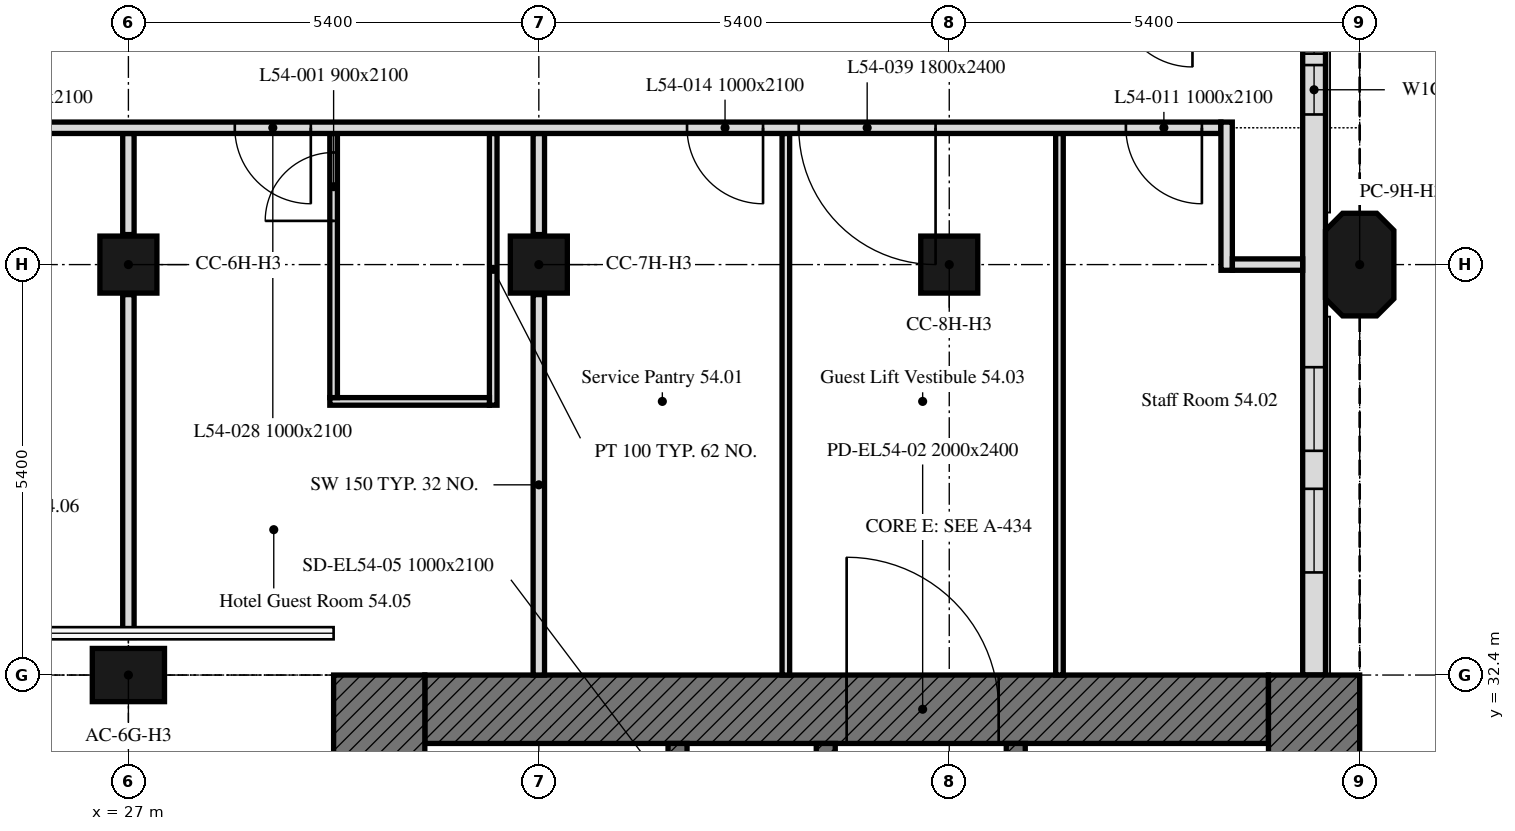
"""IFC4 building model, lengths in metres.
Left out: names, types, materials, properties, quantities, classifications, styles, units other than length and angle.
Written with IfcOpenShell. Run it as: python <this file> out.ifc"""

import sys

from ifc_helpers import new_model, si_unit, direction, frame, frame_2d, origin, origin_2d, place, context, subcontext, project, spatial, polyline, rectangle, outline, extrude, element, fill, save


model = new_model("IFC4")
c1 = context("Model", 3, precision=1e-05, world=origin(), true_north=direction((0.0, 1.0)))
c2 = subcontext(c1, "Body", "Model", "MODEL_VIEW")
j1 = project(units=[si_unit("LENGTHUNIT", "METRE"), si_unit("PLANEANGLEUNIT", "RADIAN")], contexts=[c1])
p1 = place(None, origin())
s1 = spatial("IfcSite", under=j1, at=p1, CompositionType="ELEMENT")
p2 = place(p1, origin())
s2 = spatial("IfcBuilding", under=s1, at=p2, CompositionType="ELEMENT")
p3 = place(p2, frame((0.0, 0.0, 217.0)))
s3 = spatial("IfcBuildingStorey", under=s2, at=p3, CompositionType="ELEMENT", Elevation=217.0)
p4 = place(p3, frame((27.0, 32.4, 0.0), z_axis=(0.0, 0.0, 1.0), x_axis=(1.0, 0.0, 0.0)))
e1 = element("IfcColumn", 1, at=p4, inside=s3, PredefinedType="COLUMN", context=c2, shape_type="SweptSolid", body=[
    extrude(rectangle(XDim=0.95, YDim=0.7, at=origin_2d()), origin(), (0.0, 0.0, 1.0), 3.0),
])
for number, where, z_axis, x_axis in (
    (2, (27.0, 37.8, 0.0), (0.0, 0.0, 1.0), (1.0, 0.0, 0.0)),
    (3, (32.4, 37.8, 0.0), (0.0, 0.0, 1.0), (1.0, 0.0, 0.0)),
    (4, (37.8, 37.8, 0.0), (0.0, 0.0, 1.0), (1.0, 0.0, 0.0)),
):
    element("IfcColumn", number, at=place(p3, frame(where, z_axis=z_axis, x_axis=x_axis)), inside=s3, PredefinedType="COLUMN", context=c2, shape_type="SweptSolid", body=[
        extrude(rectangle(XDim=0.75, YDim=0.75, at=origin_2d()), origin(), (0.0, 0.0, 1.0), 3.0),
    ])
p5 = place(p3, frame((43.2, 37.8, 0.0), z_axis=(0.0, 0.0, 1.0), x_axis=(0.0, 1.0, 0.0)))
e5 = element("IfcColumn", 5, at=p5, inside=s3, PredefinedType="COLUMN", context=c2, shape_type="SweptSolid", body=[
    extrude(outline(polyline([(-0.45, -0.45), (0.45, -0.45), (0.675, -0.225), (0.675, 0.225), (0.45, 0.45), (-0.45, 0.45), (-0.675, 0.225), (-0.675, -0.225), (-0.45, -0.45)])), origin(), (0.0, 0.0, 1.0), 3.0),
])
p6 = place(p3, frame((42.6, 32.4, 0.0), z_axis=(0.0, 0.0, 1.0), x_axis=(0.0, 1.0, 0.0)))
e6 = element("IfcWall", 6, at=p6, inside=s3, PredefinedType="SOLIDWALL", context=c2, shape_type="SweptSolid", body=[
    extrude(rectangle(XDim=10.614, YDim=0.3, at=frame_2d((5.307, 0.0))), origin(), (0.0, 0.0, 1.0), 3.0),
])
p7 = place(p6, frame((1.35, 0.0, 0.9)))
e7 = element("IfcOpeningElement", 7, at=p7, cuts=e6, PredefinedType="OPENING", context=c2, shape_type="SweptSolid", body=[
    extrude(rectangle(XDim=1.1, YDim=1.7, at=frame_2d((0.55, 0.85))), frame((0.0, 0.16, 0.0), z_axis=(0.0, -1.0, 0.0), x_axis=(1.0, 0.0, 0.0)), (0.0, 0.0, 1.0), 0.32),
])
p8 = place(p6, frame((2.95, 0.0, 0.9)))
e8 = element("IfcOpeningElement", 8, at=p8, cuts=e6, PredefinedType="OPENING", context=c2, shape_type="SweptSolid", body=[
    extrude(rectangle(XDim=1.1, YDim=1.7, at=frame_2d((0.55, 0.85))), frame((0.0, 0.16, 0.0), z_axis=(0.0, -1.0, 0.0), x_axis=(1.0, 0.0, 0.0)), (0.0, 0.0, 1.0), 0.32),
])
p9 = place(p6, frame((7.375, 0.0, 0.9)))
e9 = element("IfcOpeningElement", 9, at=p9, cuts=e6, PredefinedType="OPENING", context=c2, shape_type="SweptSolid", body=[
    extrude(rectangle(XDim=0.65, YDim=1.7, at=frame_2d((0.325, 0.85))), frame((0.0, 0.16, 0.0), z_axis=(0.0, -1.0, 0.0), x_axis=(1.0, 0.0, 0.0)), (0.0, 0.0, 1.0), 0.32),
])
p10 = place(p6, frame((8.175, 0.0, 0.9)))
e10 = element("IfcOpeningElement", 10, at=p10, cuts=e6, PredefinedType="OPENING", context=c2, shape_type="SweptSolid", body=[
    extrude(rectangle(XDim=0.65, YDim=1.7, at=frame_2d((0.325, 0.85))), frame((0.0, 0.16, 0.0), z_axis=(0.0, -1.0, 0.0), x_axis=(1.0, 0.0, 0.0)), (0.0, 0.0, 1.0), 0.32),
])
p11 = place(p3, frame((30.9, 31.95, 0.0), z_axis=(0.0, 0.0, 1.0), x_axis=(1.0, 0.0, 0.0)))
e11 = element("IfcWall", 11, at=p11, inside=s3, PredefinedType="SOLIDWALL", context=c2, shape_type="SweptSolid", body=[
    extrude(rectangle(XDim=11.1, YDim=0.9, at=frame_2d((5.55, 0.0))), origin(), (0.0, 0.0, 1.0), 3.0),
])
p12 = place(p11, frame((5.55, 0.0, 0.0)))
e12 = element("IfcOpeningElement", 12, at=p12, cuts=e11, PredefinedType="OPENING", context=c2, shape_type="SweptSolid", body=[
    extrude(rectangle(XDim=2.0, YDim=2.4, at=frame_2d((1.0, 1.2))), frame((0.0, 0.45, 0.0), z_axis=(0.0, -1.0, 0.0), x_axis=(1.0, 0.0, 0.0)), (0.0, 0.0, 1.0), 0.9),
])
for number, where, z_axis, x_axis in (
    (13, (42.6, 32.4, 0.0), (0.0, 0.0, 1.0), (0.0, -1.0, 0.0)),
    (14, (30.3, 16.2, 0.0), (0.0, 0.0, 1.0), (0.0, 1.0, 0.0)),
):
    element("IfcWall", number, at=place(p3, frame(where, z_axis=z_axis, x_axis=x_axis)), inside=s3, PredefinedType="SOLIDWALL", context=c2, shape_type="SweptSolid", body=[
        extrude(rectangle(XDim=16.2, YDim=1.2, at=frame_2d((8.1, 0.0))), origin(), (0.0, 0.0, 1.0), 3.0),
    ])
p13 = place(p3, frame((38.675, 17.1, 0.0), z_axis=(0.0, 0.0, 1.0), x_axis=(0.0, 1.0, 0.0)))
e15 = element("IfcWall", 15, at=p13, inside=s3, PredefinedType="SOLIDWALL", context=c2, shape_type="SweptSolid", body=[
    extrude(rectangle(XDim=14.4, YDim=0.25, at=frame_2d((7.2, 0.0))), origin(), (0.0, 0.0, 1.0), 3.0),
])
p14 = place(p13, frame((4.6, 0.0, 0.0)))
e16 = element("IfcOpeningElement", 16, at=p14, cuts=e15, PredefinedType="OPENING", context=c2, shape_type="SweptSolid", body=[
    extrude(rectangle(XDim=1.0, YDim=2.1, at=frame_2d((0.5, 1.05))), frame((0.0, 0.125, 0.0), z_axis=(0.0, -1.0, 0.0), x_axis=(1.0, 0.0, 0.0)), (0.0, 0.0, 1.0), 0.25),
])
p15 = place(p13, frame((7.062, 0.0, 0.0)))
e17 = element("IfcOpeningElement", 17, at=p15, cuts=e15, PredefinedType="OPENING", context=c2, shape_type="SweptSolid", body=[
    extrude(rectangle(XDim=1.2, YDim=2.1, at=frame_2d((0.6, 1.05))), frame((0.0, 0.125, 0.0), z_axis=(0.0, -1.0, 0.0), x_axis=(1.0, 0.0, 0.0)), (0.0, 0.0, 1.0), 0.25),
])
p16 = place(p13, frame((9.599, 0.0, 0.0)))
e18 = element("IfcOpeningElement", 18, at=p16, cuts=e15, PredefinedType="OPENING", context=c2, shape_type="SweptSolid", body=[
    extrude(rectangle(XDim=0.9, YDim=2.1, at=frame_2d((0.45, 1.05))), frame((0.0, 0.125, 0.0), z_axis=(0.0, -1.0, 0.0), x_axis=(1.0, 0.0, 0.0)), (0.0, 0.0, 1.0), 0.25),
])
p17 = place(p13, frame((11.032, 0.0, 0.0)))
e19 = element("IfcOpeningElement", 19, at=p17, cuts=e15, PredefinedType="OPENING", context=c2, shape_type="SweptSolid", body=[
    extrude(rectangle(XDim=0.9, YDim=2.1, at=frame_2d((0.45, 1.05))), frame((0.0, 0.125, 0.0), z_axis=(0.0, -1.0, 0.0), x_axis=(1.0, 0.0, 0.0)), (0.0, 0.0, 1.0), 0.25),
])
p18 = place(p13, frame((12.846, 0.0, 0.0)))
e20 = element("IfcOpeningElement", 20, at=p18, cuts=e15, PredefinedType="OPENING", context=c2, shape_type="SweptSolid", body=[
    extrude(rectangle(XDim=0.9, YDim=2.1, at=frame_2d((0.45, 1.05))), frame((0.0, 0.125, 0.0), z_axis=(0.0, -1.0, 0.0), x_axis=(1.0, 0.0, 0.0)), (0.0, 0.0, 1.0), 0.25),
])
p19 = place(p3, frame((34.225, 17.1, 0.0), z_axis=(0.0, 0.0, 1.0), x_axis=(0.0, 1.0, 0.0)))
e21 = element("IfcWall", 21, at=p19, inside=s3, PredefinedType="SOLIDWALL", context=c2, shape_type="SweptSolid", body=[
    extrude(rectangle(XDim=14.4, YDim=0.25, at=frame_2d((7.2, 0.0))), origin(), (0.0, 0.0, 1.0), 3.0),
])
p20 = place(p19, frame((13.15, 0.0, 0.0)))
e22 = element("IfcOpeningElement", 22, at=p20, cuts=e21, PredefinedType="OPENING", context=c2, shape_type="SweptSolid", body=[
    extrude(rectangle(XDim=1.0, YDim=2.1, at=frame_2d((0.5, 1.05))), frame((0.0, 0.125, 0.0), z_axis=(0.0, -1.0, 0.0), x_axis=(1.0, 0.0, 0.0)), (0.0, 0.0, 1.0), 0.25),
])
p21 = place(p19, frame((0.6, 0.0, 0.0)))
e23 = element("IfcOpeningElement", 23, at=p21, cuts=e21, PredefinedType="OPENING", context=c2, shape_type="SweptSolid", body=[
    extrude(rectangle(XDim=1.1, YDim=2.1, at=frame_2d((0.55, 1.05))), frame((0.0, 0.125, 0.0), z_axis=(0.0, -1.0, 0.0), x_axis=(1.0, 0.0, 0.0)), (0.0, 0.0, 1.0), 0.25),
])
p22 = place(p19, frame((3.25, 0.0, 0.0)))
e24 = element("IfcOpeningElement", 24, at=p22, cuts=e21, PredefinedType="OPENING", context=c2, shape_type="SweptSolid", body=[
    extrude(rectangle(XDim=0.9, YDim=2.1, at=frame_2d((0.45, 1.05))), frame((0.0, 0.125, 0.0), z_axis=(0.0, -1.0, 0.0), x_axis=(1.0, 0.0, 0.0)), (0.0, 0.0, 1.0), 0.25),
])
p23 = place(p3, frame((36.175, 29.4, 0.0), z_axis=(0.0, 0.0, 1.0), x_axis=(0.0, 1.0, 0.0)))
e25 = element("IfcWall", 25, at=p23, inside=s3, PredefinedType="SOLIDWALL", context=c2, shape_type="SweptSolid", body=[
    extrude(rectangle(XDim=2.1, YDim=0.25, at=frame_2d((1.05, 0.0))), origin(), (0.0, 0.0, 1.0), 3.0),
])
p24 = place(p23, frame((0.5, 0.0, 0.0)))
e26 = element("IfcOpeningElement", 26, at=p24, cuts=e25, PredefinedType="OPENING", context=c2, shape_type="SweptSolid", body=[
    extrude(rectangle(XDim=1.0, YDim=2.1, at=frame_2d((0.5, 1.05))), frame((0.0, 0.125, 0.0), z_axis=(0.0, -1.0, 0.0), x_axis=(1.0, 0.0, 0.0)), (0.0, 0.0, 1.0), 0.25),
])
p25 = place(p3, frame((32.4, 32.4, 0.0), z_axis=(0.0, 0.0, 1.0), x_axis=(0.0, 1.0, 0.0)))
e27 = element("IfcWall", 27, at=p25, inside=s3, PredefinedType="PARTITIONING", context=c2, shape_type="SweptSolid", body=[
    extrude(rectangle(XDim=5.005, YDim=0.15, at=frame_2d((2.502, 0.0))), origin(), (0.0, 0.0, 1.0), 2.4),
])
p26 = place(p3, frame((32.4, 38.195, 0.0), z_axis=(0.0, 0.0, 1.0), x_axis=(0.0, 1.0, 0.0)))
e28 = element("IfcWall", 28, at=p26, inside=s3, PredefinedType="PARTITIONING", context=c2, shape_type="SweptSolid", body=[
    extrude(rectangle(XDim=1.33, YDim=0.15, at=frame_2d((0.665, 0.0))), origin(), (0.0, 0.0, 1.0), 2.4),
])
p27 = place(p3, frame((31.8, 39.525, 0.0), z_axis=(0.0, 0.0, 1.0), x_axis=(0.0, -1.0, 0.0)))
e29 = element("IfcWall", 29, at=p27, inside=s3, PredefinedType="PARTITIONING", context=c2, shape_type="SweptSolid", body=[
    extrude(rectangle(XDim=3.575, YDim=0.1, at=frame_2d((1.788, 0.0))), origin(), (0.0, 0.0, 1.0), 3.0),
])
p28 = place(p3, frame((31.75, 36.0, 0.0), z_axis=(0.0, 0.0, 1.0), x_axis=(-1.0, 0.0, 0.0)))
e30 = element("IfcWall", 30, at=p28, inside=s3, PredefinedType="PARTITIONING", context=c2, shape_type="SweptSolid", body=[
    extrude(rectangle(XDim=2.1, YDim=0.1, at=frame_2d((1.05, 0.0))), origin(), (0.0, 0.0, 1.0), 3.0),
])
p29 = place(p3, frame((29.7, 36.05, 0.0), z_axis=(0.0, 0.0, 1.0), x_axis=(0.0, 1.0, 0.0)))
e31 = element("IfcWall", 31, at=p29, inside=s3, PredefinedType="PARTITIONING", context=c2, shape_type="SweptSolid", body=[
    extrude(rectangle(XDim=3.475, YDim=0.1, at=frame_2d((1.737, 0.0))), origin(), (0.0, 0.0, 1.0), 3.0),
])
p30 = place(p29, frame((2.325, 0.0, 0.0)))
e32 = element("IfcOpeningElement", 32, at=p30, cuts=e31, PredefinedType="OPENING", context=c2, shape_type="SweptSolid", body=[
    extrude(rectangle(XDim=0.9, YDim=2.1, at=frame_2d((0.45, 1.05))), frame((0.0, 0.05, 0.0), z_axis=(0.0, -1.0, 0.0), x_axis=(1.0, 0.0, 0.0)), (0.0, 0.0, 1.0), 0.1),
])
p31 = place(p3, frame((27.0, 39.525, 0.0), z_axis=(0.0, 0.0, 1.0), x_axis=(0.0, -1.0, 0.0)))
e33 = element("IfcWall", 33, at=p31, inside=s3, PredefinedType="PARTITIONING", context=c2, shape_type="SweptSolid", body=[
    extrude(rectangle(XDim=1.33, YDim=0.15, at=frame_2d((0.665, 0.0))), origin(), (0.0, 0.0, 1.0), 2.4),
])
p32 = place(p3, frame((27.0, 37.405, 0.0), z_axis=(0.0, 0.0, 1.0), x_axis=(0.0, -1.0, 0.0)))
e34 = element("IfcWall", 34, at=p32, inside=s3, PredefinedType="PARTITIONING", context=c2, shape_type="SweptSolid", body=[
    extrude(rectangle(XDim=4.51, YDim=0.15, at=frame_2d((2.255, 0.0))), origin(), (0.0, 0.0, 1.0), 2.4),
])
for number, where, z_axis, x_axis in (
    (35, (39.25, 32.4, 0.0), (0.0, 0.0, 1.0), (0.0, 1.0, 0.0)),
    (36, (35.65, 39.525, 0.0), (0.0, 0.0, 1.0), (0.0, -1.0, 0.0)),
):
    element("IfcWall", number, at=place(p3, frame(where, z_axis=z_axis, x_axis=x_axis)), inside=s3, PredefinedType="PARTITIONING", context=c2, shape_type="SweptSolid", body=[
        extrude(rectangle(XDim=7.125, YDim=0.1, at=frame_2d((3.562, 0.0))), origin(), (0.0, 0.0, 1.0), 3.0),
    ])
p33 = place(p3, frame((41.374, 39.6, 0.0), z_axis=(0.0, 0.0, 1.0), x_axis=(-1.0, 0.0, 0.0)))
e37 = element("IfcWall", 37, at=p33, inside=s3, PredefinedType="PARTITIONING", context=c2, shape_type="SweptSolid", body=[
    extrude(rectangle(XDim=35.899, YDim=0.15, at=frame_2d((17.949, 0.0))), origin(), (0.0, 0.0, 1.0), 2.4),
])
p34 = place(p33, frame((0.25, 0.0, 0.0)))
e38 = element("IfcOpeningElement", 38, at=p34, cuts=e37, PredefinedType="OPENING", context=c2, shape_type="SweptSolid", body=[
    extrude(rectangle(XDim=1.0, YDim=2.1, at=frame_2d((0.5, 1.05))), frame((0.0, 0.075, 0.0), z_axis=(0.0, -1.0, 0.0), x_axis=(1.0, 0.0, 0.0)), (0.0, 0.0, 1.0), 0.15),
])
p35 = place(p33, frame((27.124, 0.0, 0.0)))
e39 = element("IfcOpeningElement", 39, at=p35, cuts=e37, PredefinedType="OPENING", context=c2, shape_type="SweptSolid", body=[
    extrude(rectangle(XDim=1.0, YDim=2.1, at=frame_2d((0.5, 1.05))), frame((0.0, 0.075, 0.0), z_axis=(0.0, -1.0, 0.0), x_axis=(1.0, 0.0, 0.0)), (0.0, 0.0, 1.0), 0.15),
])
p36 = place(p33, frame((6.024, 0.0, 0.0)))
e40 = element("IfcOpeningElement", 40, at=p36, cuts=e37, PredefinedType="OPENING", context=c2, shape_type="SweptSolid", body=[
    extrude(rectangle(XDim=1.0, YDim=2.1, at=frame_2d((0.5, 1.05))), frame((0.0, 0.075, 0.0), z_axis=(0.0, -1.0, 0.0), x_axis=(1.0, 0.0, 0.0)), (0.0, 0.0, 1.0), 0.15),
])
p37 = place(p33, frame((11.974, 0.0, 0.0)))
e41 = element("IfcOpeningElement", 41, at=p37, cuts=e37, PredefinedType="OPENING", context=c2, shape_type="SweptSolid", body=[
    extrude(rectangle(XDim=1.0, YDim=2.1, at=frame_2d((0.5, 1.05))), frame((0.0, 0.075, 0.0), z_axis=(0.0, -1.0, 0.0), x_axis=(1.0, 0.0, 0.0)), (0.0, 0.0, 1.0), 0.15),
])
p38 = place(p33, frame((15.774, 0.0, 0.0)))
e42 = element("IfcOpeningElement", 42, at=p38, cuts=e37, PredefinedType="OPENING", context=c2, shape_type="SweptSolid", body=[
    extrude(rectangle(XDim=1.0, YDim=2.1, at=frame_2d((0.5, 1.05))), frame((0.0, 0.075, 0.0), z_axis=(0.0, -1.0, 0.0), x_axis=(1.0, 0.0, 0.0)), (0.0, 0.0, 1.0), 0.15),
])
p39 = place(p33, frame((22.774, 0.0, 0.0)))
e43 = element("IfcOpeningElement", 43, at=p39, cuts=e37, PredefinedType="OPENING", context=c2, shape_type="SweptSolid", body=[
    extrude(rectangle(XDim=1.0, YDim=2.1, at=frame_2d((0.5, 1.05))), frame((0.0, 0.075, 0.0), z_axis=(0.0, -1.0, 0.0), x_axis=(1.0, 0.0, 0.0)), (0.0, 0.0, 1.0), 0.15),
])
p40 = place(p33, frame((3.754, 0.0, 0.0)))
e44 = element("IfcOpeningElement", 44, at=p40, cuts=e37, PredefinedType="OPENING", context=c2, shape_type="SweptSolid", body=[
    extrude(rectangle(XDim=1.8, YDim=2.4, at=frame_2d((0.9, 1.2))), frame((0.0, 0.075, 0.0), z_axis=(0.0, -1.0, 0.0), x_axis=(1.0, 0.0, 0.0)), (0.0, 0.0, 1.0), 0.15),
])
p41 = place(p33, frame((29.124, 0.0, 0.0)))
e45 = element("IfcOpeningElement", 45, at=p41, cuts=e37, PredefinedType="OPENING", context=c2, shape_type="SweptSolid", body=[
    extrude(rectangle(XDim=1.0, YDim=2.1, at=frame_2d((0.5, 1.05))), frame((0.0, 0.075, 0.0), z_axis=(0.0, -1.0, 0.0), x_axis=(1.0, 0.0, 0.0)), (0.0, 0.0, 1.0), 0.15),
])
p42 = place(p3, frame((41.449, 39.675, 0.0), z_axis=(0.0, 0.0, 1.0), x_axis=(0.00050081376, -0.999999874593, 0.0)))
e46 = element("IfcWall", 46, at=p42, inside=s3, PredefinedType="PARTITIONING", context=c2, shape_type="SweptSolid", body=[
    extrude(rectangle(XDim=1.95, YDim=0.15, at=frame_2d((0.975, 0.0))), origin(), (0.0, 0.0, 1.0), 3.0),
])
p43 = place(p3, frame((41.525, 37.8, 0.0), z_axis=(0.0, 0.0, 1.0), x_axis=(1.0, 0.0, 0.0)))
e47 = element("IfcWall", 47, at=p43, inside=s3, PredefinedType="PARTITIONING", context=c2, shape_type="SweptSolid", body=[
    extrude(rectangle(XDim=0.925, YDim=0.15, at=frame_2d((0.462, 0.0))), origin(), (0.0, 0.0, 1.0), 3.0),
])
p44 = place(p7, origin())
e48 = element("IfcWindow", 48, at=p44, inside=s3, PartitioningType="SINGLE_PANEL", PredefinedType="WINDOW", context=c2, shape_type="SweptSolid", body=[
    extrude(rectangle(XDim=1.1, YDim=1.7, at=frame_2d((0.55, 0.85))), frame((0.0, 0.03, 0.0), z_axis=(0.0, -1.0, 0.0), x_axis=(1.0, 0.0, 0.0)), (0.0, 0.0, 1.0), 0.06),
])
fill(e7, e48)
p45 = place(p8, origin())
e49 = element("IfcWindow", 49, at=p45, inside=s3, PartitioningType="SINGLE_PANEL", PredefinedType="WINDOW", context=c2, shape_type="SweptSolid", body=[
    extrude(rectangle(XDim=1.1, YDim=1.7, at=frame_2d((0.55, 0.85))), frame((0.0, 0.03, 0.0), z_axis=(0.0, -1.0, 0.0), x_axis=(1.0, 0.0, 0.0)), (0.0, 0.0, 1.0), 0.06),
])
fill(e8, e49)
p46 = place(p9, origin())
e50 = element("IfcWindow", 50, at=p46, inside=s3, PartitioningType="SINGLE_PANEL", PredefinedType="WINDOW", context=c2, shape_type="SweptSolid", body=[
    extrude(rectangle(XDim=0.65, YDim=1.7, at=frame_2d((0.325, 0.85))), frame((0.0, 0.03, 0.0), z_axis=(0.0, -1.0, 0.0), x_axis=(1.0, 0.0, 0.0)), (0.0, 0.0, 1.0), 0.06),
])
fill(e9, e50)
p47 = place(p10, origin())
e51 = element("IfcWindow", 51, at=p47, inside=s3, PartitioningType="SINGLE_PANEL", PredefinedType="WINDOW", context=c2, shape_type="SweptSolid", body=[
    extrude(rectangle(XDim=0.65, YDim=1.7, at=frame_2d((0.325, 0.85))), frame((0.0, 0.03, 0.0), z_axis=(0.0, -1.0, 0.0), x_axis=(1.0, 0.0, 0.0)), (0.0, 0.0, 1.0), 0.06),
])
fill(e10, e51)
p48 = place(p12, origin())
e52 = element("IfcDoor", 52, at=p48, inside=s3, OperationType="DOUBLE_DOOR_SINGLE_SWING", PredefinedType="DOOR", context=c2, shape_type="SweptSolid", body=[
    extrude(rectangle(XDim=2.0, YDim=2.4, at=frame_2d((1.0, 1.2))), frame((0.0, 0.025, 0.0), z_axis=(0.0, -1.0, 0.0), x_axis=(1.0, 0.0, 0.0)), (0.0, 0.0, 1.0), 0.05),
])
fill(e12, e52)
p49 = place(p30, origin())
e53 = element("IfcDoor", 53, at=p49, inside=s3, OperationType="SINGLE_SWING_RIGHT", PredefinedType="DOOR", context=c2, shape_type="SweptSolid", body=[
    extrude(rectangle(XDim=0.9, YDim=2.1, at=frame_2d((0.45, 1.05))), frame((0.0, 0.025, 0.0), z_axis=(0.0, -1.0, 0.0), x_axis=(1.0, 0.0, 0.0)), (0.0, 0.0, 1.0), 0.05),
])
fill(e32, e53)
p50 = place(p34, origin())
e54 = element("IfcDoor", 54, at=p50, inside=s3, OperationType="SINGLE_SWING_RIGHT", PredefinedType="DOOR", context=c2, shape_type="SweptSolid", body=[
    extrude(rectangle(XDim=1.0, YDim=2.1, at=frame_2d((0.5, 1.05))), frame((0.0, 0.025, 0.0), z_axis=(0.0, -1.0, 0.0), x_axis=(1.0, 0.0, 0.0)), (0.0, 0.0, 1.0), 0.05),
])
fill(e38, e54)
p51 = place(p36, origin())
e55 = element("IfcDoor", 55, at=p51, inside=s3, OperationType="SINGLE_SWING_LEFT", PredefinedType="DOOR", context=c2, shape_type="SweptSolid", body=[
    extrude(rectangle(XDim=1.0, YDim=2.1, at=frame_2d((0.5, 1.05))), frame((0.0, 0.025, 0.0), z_axis=(0.0, -1.0, 0.0), x_axis=(1.0, 0.0, 0.0)), (0.0, 0.0, 1.0), 0.05),
])
fill(e40, e55)
p52 = place(p37, origin())
e56 = element("IfcDoor", 56, at=p52, inside=s3, OperationType="SINGLE_SWING_LEFT", PredefinedType="DOOR", context=c2, shape_type="SweptSolid", body=[
    extrude(rectangle(XDim=1.0, YDim=2.1, at=frame_2d((0.5, 1.05))), frame((0.0, 0.025, 0.0), z_axis=(0.0, -1.0, 0.0), x_axis=(1.0, 0.0, 0.0)), (0.0, 0.0, 1.0), 0.05),
])
fill(e41, e56)
p53 = place(p40, origin())
e57 = element("IfcDoor", 57, at=p53, inside=s3, OperationType="DOUBLE_DOOR_SINGLE_SWING", PredefinedType="DOOR", context=c2, shape_type="SweptSolid", body=[
    extrude(rectangle(XDim=1.8, YDim=2.4, at=frame_2d((0.9, 1.2))), frame((0.0, 0.025, 0.0), z_axis=(0.0, -1.0, 0.0), x_axis=(1.0, 0.0, 0.0)), (0.0, 0.0, 1.0), 0.05),
])
fill(e44, e57)
save(model, sys.argv[1])
